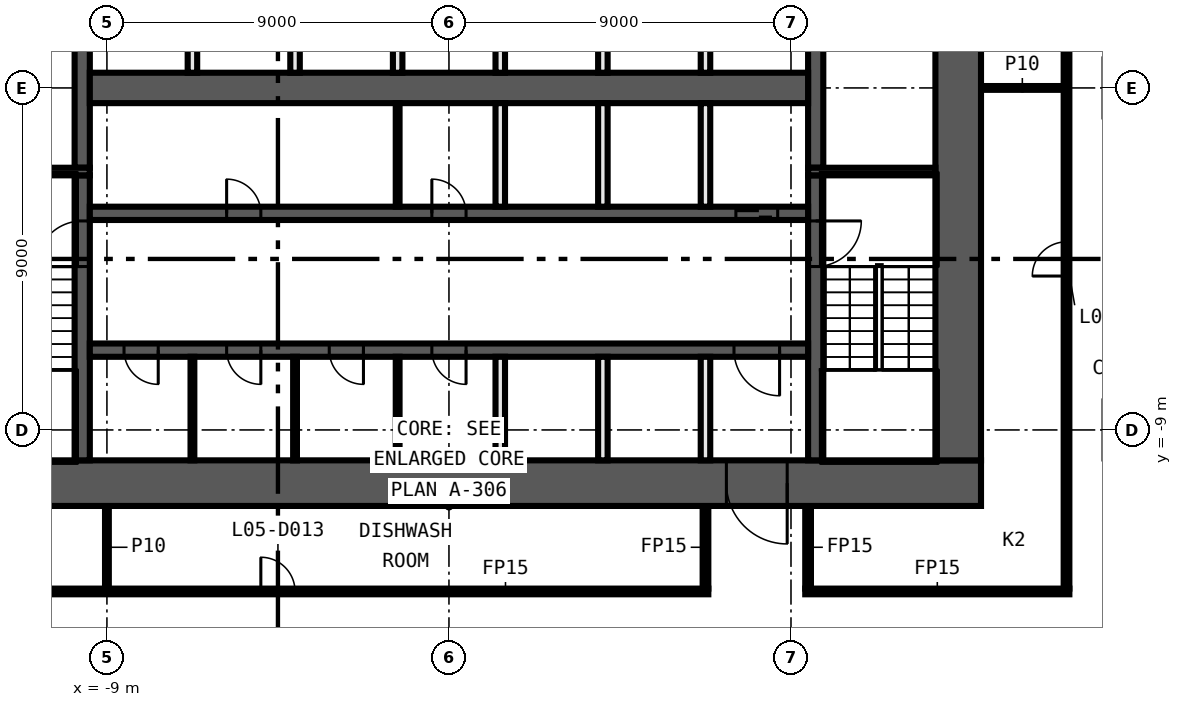
"""IFC4 building model, lengths in metres.
Left out: names, types, materials, properties, quantities, classifications, styles, units other than length and angle.
Written with IfcOpenShell. Run it as: python <this file> out.ifc"""

import sys

from ifc_helpers import new_model, si_unit, direction, frame, frame_2d, origin, place, context, subcontext, project, spatial, rectangle, extrude, element, fill, save


model = new_model("IFC4")
c1 = context("Model", 3, precision=1e-05, world=origin(), true_north=direction((0.0, 1.0)))
c2 = subcontext(c1, "Body", "Model", "MODEL_VIEW")
j1 = project(units=[si_unit("LENGTHUNIT", "METRE"), si_unit("PLANEANGLEUNIT", "RADIAN")], contexts=[c1])
p1 = place(None, origin())
s1 = spatial("IfcSite", under=j1, at=p1, CompositionType="ELEMENT")
p2 = place(p1, origin())
s2 = spatial("IfcBuilding", under=s1, at=p2, CompositionType="ELEMENT")
p3 = place(p2, frame((0.0, 0.0, 38.0)))
s3 = spatial("IfcBuildingStorey", under=s2, at=p3, CompositionType="ELEMENT", Elevation=38.0)
p4 = place(p3, frame((-16.325, -13.25, 0.0), z_axis=(0.0, 0.0, 1.0), x_axis=(1.0, 0.0, 0.0)))
e1 = element("IfcWall", 1, at=p4, inside=s3, PredefinedType="PARTITIONING", context=c2, shape_type="SweptSolid", body=[
    extrude(rectangle(XDim=23.15, YDim=0.15, at=frame_2d((11.575, 0.0))), origin(), (0.0, 0.0, 1.0), 5.6),
])
p5 = place(p4, frame((3.25, 0.0, 0.0)))
e2 = element("IfcOpeningElement", 2, at=p5, cuts=e1, PredefinedType="OPENING", context=c2, shape_type="SweptSolid", body=[
    extrude(rectangle(XDim=0.9, YDim=2.1, at=frame_2d((0.45, 1.05))), frame((0.0, 0.085, 0.0), z_axis=(0.0, -1.0, 0.0), x_axis=(1.0, 0.0, 0.0)), (0.0, 0.0, 1.0), 0.17),
])
p6 = place(p4, frame((11.375, 0.0, 0.0)))
e3 = element("IfcOpeningElement", 3, at=p6, cuts=e1, PredefinedType="OPENING", context=c2, shape_type="SweptSolid", body=[
    extrude(rectangle(XDim=0.9, YDim=2.1, at=frame_2d((0.45, 1.05))), frame((0.0, 0.085, 0.0), z_axis=(0.0, -1.0, 0.0), x_axis=(1.0, 0.0, 0.0)), (0.0, 0.0, 1.0), 0.17),
])
p7 = place(p3, frame((9.375, -13.25, 0.0), z_axis=(0.0, 0.0, 1.0), x_axis=(1.0, 0.0, 0.0)))
e4 = element("IfcWall", 4, at=p7, inside=s3, PredefinedType="PARTITIONING", context=c2, shape_type="SweptSolid", body=[
    extrude(rectangle(XDim=6.95, YDim=0.15, at=frame_2d((3.475, 0.0))), origin(), (0.0, 0.0, 1.0), 5.6),
])
p8 = place(p3, frame((14.0, 0.0, 0.0), z_axis=(0.0, 0.0, 1.0), x_axis=(1.0, 0.0, 0.0)))
e5 = element("IfcWall", 5, at=p8, inside=s3, PredefinedType="PARTITIONING", context=c2, shape_type="SweptSolid", body=[
    extrude(rectangle(XDim=2.175, YDim=0.1, at=frame_2d((1.087, 0.0))), origin(), (0.0, 0.0, 1.0), 5.6),
])
p9 = place(p3, frame((16.25, -13.175, 0.0), z_axis=(0.0, 0.0, 1.0), x_axis=(0.0, 1.0, 0.0)))
e6 = element("IfcWall", 6, at=p9, inside=s3, PredefinedType="PARTITIONING", context=c2, shape_type="SweptSolid", body=[
    extrude(rectangle(XDim=26.35, YDim=0.15, at=frame_2d((13.175, 0.0))), origin(), (0.0, 0.0, 1.0), 5.6),
])
p10 = place(p9, frame((8.225, 0.0, 0.0)))
e7 = element("IfcOpeningElement", 7, at=p10, cuts=e6, PredefinedType="OPENING", context=c2, shape_type="SweptSolid", body=[
    extrude(rectangle(XDim=0.9, YDim=2.1, at=frame_2d((0.45, 1.05))), frame((0.0, 0.085, 0.0), z_axis=(0.0, -1.0, 0.0), x_axis=(1.0, 0.0, 0.0)), (0.0, 0.0, 1.0), 0.17),
])
p11 = place(p9, frame((17.225, 0.0, 0.0)))
e8 = element("IfcOpeningElement", 8, at=p11, cuts=e6, PredefinedType="OPENING", context=c2, shape_type="SweptSolid", body=[
    extrude(rectangle(XDim=0.9, YDim=2.1, at=frame_2d((0.45, 1.05))), frame((0.0, 0.085, 0.0), z_axis=(0.0, -1.0, 0.0), x_axis=(1.0, 0.0, 0.0)), (0.0, 0.0, 1.0), 0.17),
])
for number, where, z_axis, x_axis in (
    (9, (9.45, -13.175, 0.0), (0.0, 0.0, 1.0), (0.0, 1.0, 0.0)),
    (10, (6.75, -13.175, 0.0), (0.0, 0.0, 1.0), (0.0, 1.0, 0.0)),
):
    element("IfcWall", number, at=place(p3, frame(where, z_axis=z_axis, x_axis=x_axis)), inside=s3, PredefinedType="PARTITIONING", context=c2, shape_type="SweptSolid", body=[
        extrude(rectangle(XDim=2.175, YDim=0.15, at=frame_2d((1.087, 0.0))), origin(), (0.0, 0.0, 1.0), 5.6),
    ])
p12 = place(p3, frame((-9.0, -13.175, 0.0), z_axis=(0.0, 0.0, 1.0), x_axis=(0.0, 1.0, 0.0)))
e11 = element("IfcWall", 11, at=p12, inside=s3, PredefinedType="PARTITIONING", context=c2, shape_type="SweptSolid", body=[
    extrude(rectangle(XDim=2.175, YDim=0.1, at=frame_2d((1.087, 0.0))), origin(), (0.0, 0.0, 1.0), 5.6),
])
p13 = place(p3, frame((14.0, -10.4, 0.0), z_axis=(0.0, 0.0, 1.0), x_axis=(-1.0, 0.0, 0.0)))
e12 = element("IfcWall", 12, at=p13, inside=s3, PredefinedType="SHEAR", context=c2, shape_type="SweptSolid", body=[
    extrude(rectangle(XDim=28.0, YDim=1.2, at=frame_2d((14.0, 0.0))), origin(), (0.0, 0.0, 1.0), 5.6),
])
p14 = place(p13, frame((5.1, 0.0, 0.0)))
e13 = element("IfcOpeningElement", 13, at=p14, cuts=e12, PredefinedType="OPENING", context=c2, shape_type="SweptSolid", body=[
    extrude(rectangle(XDim=1.6, YDim=2.1, at=frame_2d((0.8, 1.05))), frame((0.0, 0.61, 0.0), z_axis=(0.0, -1.0, 0.0), x_axis=(1.0, 0.0, 0.0)), (0.0, 0.0, 1.0), 1.22),
])
p15 = place(p3, frame((13.4, 9.8, 0.0), z_axis=(0.0, 0.0, 1.0), x_axis=(0.0, -1.0, 0.0)))
e14 = element("IfcWall", 14, at=p15, inside=s3, PredefinedType="SHEAR", context=c2, shape_type="SweptSolid", body=[
    extrude(rectangle(XDim=19.6, YDim=1.2, at=frame_2d((9.8, 0.0))), origin(), (0.0, 0.0, 1.0), 5.6),
])
p16 = place(p3, frame((9.65, -2.3, 0.0), z_axis=(0.0, 0.0, 1.0), x_axis=(0.0, -1.0, 0.0)))
e15 = element("IfcWall", 15, at=p16, inside=s3, PredefinedType="SHEAR", context=c2, shape_type="SweptSolid", body=[
    extrude(rectangle(XDim=7.5, YDim=0.4, at=frame_2d((3.75, 0.0))), origin(), (0.0, 0.0, 1.0), 5.6),
])
p17 = place(p16, frame((1.2, 0.0, 0.0)))
e16 = element("IfcOpeningElement", 16, at=p17, cuts=e15, PredefinedType="OPENING", context=c2, shape_type="SweptSolid", body=[
    extrude(rectangle(XDim=1.2, YDim=2.1, at=frame_2d((0.6, 1.05))), frame((0.0, 0.21, 0.0), z_axis=(0.0, -1.0, 0.0), x_axis=(1.0, 0.0, 0.0)), (0.0, 0.0, 1.0), 0.42),
])
p18 = place(p3, frame((9.65, 2.1, 0.0), z_axis=(0.0, 0.0, 1.0), x_axis=(0.0, -1.0, 0.0)))
e17 = element("IfcWall", 17, at=p18, inside=s3, PredefinedType="SHEAR", context=c2, shape_type="SweptSolid", body=[
    extrude(rectangle(XDim=4.2, YDim=0.4, at=frame_2d((2.1, 0.0))), origin(), (0.0, 0.0, 1.0), 5.6),
])
p19 = place(p18, frame((0.15, 0.0, 0.0)))
e18 = element("IfcOpeningElement", 18, at=p19, cuts=e17, PredefinedType="OPENING", context=c2, shape_type="SweptSolid", body=[
    extrude(rectangle(XDim=0.9, YDim=2.1, at=frame_2d((0.45, 1.05))), frame((0.0, 0.21, 0.0), z_axis=(0.0, -1.0, 0.0), x_axis=(1.0, 0.0, 0.0)), (0.0, 0.0, 1.0), 0.42),
])
p20 = place(p3, frame((-9.65, -9.8, 0.0), z_axis=(0.0, 0.0, 1.0), x_axis=(0.0, 1.0, 0.0)))
e19 = element("IfcWall", 19, at=p20, inside=s3, PredefinedType="SHEAR", context=c2, shape_type="SweptSolid", body=[
    extrude(rectangle(XDim=7.5, YDim=0.4, at=frame_2d((3.75, 0.0))), origin(), (0.0, 0.0, 1.0), 5.6),
])
p21 = place(p20, frame((5.1, 0.0, 0.0)))
e20 = element("IfcOpeningElement", 20, at=p21, cuts=e19, PredefinedType="OPENING", context=c2, shape_type="SweptSolid", body=[
    extrude(rectangle(XDim=1.2, YDim=2.1, at=frame_2d((0.6, 1.05))), frame((0.0, 0.21, 0.0), z_axis=(0.0, -1.0, 0.0), x_axis=(1.0, 0.0, 0.0)), (0.0, 0.0, 1.0), 0.42),
])
p22 = place(p3, frame((-9.65, -2.1, 0.0), z_axis=(0.0, 0.0, 1.0), x_axis=(0.0, 1.0, 0.0)))
e21 = element("IfcWall", 21, at=p22, inside=s3, PredefinedType="SHEAR", context=c2, shape_type="SweptSolid", body=[
    extrude(rectangle(XDim=4.2, YDim=0.4, at=frame_2d((2.1, 0.0))), origin(), (0.0, 0.0, 1.0), 5.6),
])
for number, where, z_axis, x_axis in (
    (22, (9.45, -2.2, 0.0), (0.0, 0.0, 1.0), (1.0, 0.0, 0.0)),
    (23, (-9.45, -2.2, 0.0), (0.0, 0.0, 1.0), (-1.0, 0.0, 0.0)),
):
    element("IfcWall", number, at=place(p3, frame(where, z_axis=z_axis, x_axis=x_axis)), inside=s3, PredefinedType="SHEAR", context=c2, shape_type="SweptSolid", body=[
        extrude(rectangle(XDim=3.35, YDim=0.2, at=frame_2d((1.675, 0.0))), origin(), (0.0, 0.0, 1.0), 5.6),
    ])
p23 = place(p3, frame((-9.45, -3.3, 0.0), z_axis=(0.0, 0.0, 1.0), x_axis=(1.0, 0.0, 0.0)))
e24 = element("IfcWall", 24, at=p23, inside=s3, PredefinedType="SHEAR", context=c2, shape_type="SweptSolid", body=[
    extrude(rectangle(XDim=18.9, YDim=0.35, at=frame_2d((9.45, 0.0))), origin(), (0.0, 0.0, 1.0), 5.6),
])
p24 = place(p23, frame((17.0, 0.0, 0.0)))
e25 = element("IfcOpeningElement", 25, at=p24, cuts=e24, PredefinedType="OPENING", context=c2, shape_type="SweptSolid", body=[
    extrude(rectangle(XDim=1.1, YDim=2.1, at=frame_2d((0.55, 1.05))), frame((0.0, 0.185, 0.0), z_axis=(0.0, -1.0, 0.0), x_axis=(1.0, 0.0, 0.0)), (0.0, 0.0, 1.0), 0.37),
])
p25 = place(p23, frame((3.6, 0.0, 0.0)))
e26 = element("IfcOpeningElement", 26, at=p25, cuts=e24, PredefinedType="OPENING", context=c2, shape_type="SweptSolid", body=[
    extrude(rectangle(XDim=0.9, YDim=2.1, at=frame_2d((0.45, 1.05))), frame((0.0, 0.185, 0.0), z_axis=(0.0, -1.0, 0.0), x_axis=(1.0, 0.0, 0.0)), (0.0, 0.0, 1.0), 0.37),
])
p26 = place(p23, frame((9.0, 0.0, 0.0)))
e27 = element("IfcOpeningElement", 27, at=p26, cuts=e24, PredefinedType="OPENING", context=c2, shape_type="SweptSolid", body=[
    extrude(rectangle(XDim=0.9, YDim=2.1, at=frame_2d((0.45, 1.05))), frame((0.0, 0.185, 0.0), z_axis=(0.0, -1.0, 0.0), x_axis=(1.0, 0.0, 0.0)), (0.0, 0.0, 1.0), 0.37),
])
p27 = place(p3, frame((9.45, -6.9, 0.0), z_axis=(0.0, 0.0, 1.0), x_axis=(-1.0, 0.0, 0.0)))
e28 = element("IfcWall", 28, at=p27, inside=s3, PredefinedType="SHEAR", context=c2, shape_type="SweptSolid", body=[
    extrude(rectangle(XDim=18.9, YDim=0.35, at=frame_2d((9.45, 0.0))), origin(), (0.0, 0.0, 1.0), 5.6),
])
p28 = place(p27, frame((0.75, 0.0, 0.0)))
e29 = element("IfcOpeningElement", 29, at=p28, cuts=e28, PredefinedType="OPENING", context=c2, shape_type="SweptSolid", body=[
    extrude(rectangle(XDim=1.2, YDim=2.1, at=frame_2d((0.6, 1.05))), frame((0.0, 0.185, 0.0), z_axis=(0.0, -1.0, 0.0), x_axis=(1.0, 0.0, 0.0)), (0.0, 0.0, 1.0), 0.37),
])
p29 = place(p27, frame((17.1, 0.0, 0.0)))
e30 = element("IfcOpeningElement", 30, at=p29, cuts=e28, PredefinedType="OPENING", context=c2, shape_type="SweptSolid", body=[
    extrude(rectangle(XDim=0.9, YDim=2.1, at=frame_2d((0.45, 1.05))), frame((0.0, 0.185, 0.0), z_axis=(0.0, -1.0, 0.0), x_axis=(1.0, 0.0, 0.0)), (0.0, 0.0, 1.0), 0.37),
])
p30 = place(p27, frame((14.4, 0.0, 0.0)))
e31 = element("IfcOpeningElement", 31, at=p30, cuts=e28, PredefinedType="OPENING", context=c2, shape_type="SweptSolid", body=[
    extrude(rectangle(XDim=0.9, YDim=2.1, at=frame_2d((0.45, 1.05))), frame((0.0, 0.185, 0.0), z_axis=(0.0, -1.0, 0.0), x_axis=(1.0, 0.0, 0.0)), (0.0, 0.0, 1.0), 0.37),
])
p31 = place(p27, frame((11.7, 0.0, 0.0)))
e32 = element("IfcOpeningElement", 32, at=p31, cuts=e28, PredefinedType="OPENING", context=c2, shape_type="SweptSolid", body=[
    extrude(rectangle(XDim=0.9, YDim=2.1, at=frame_2d((0.45, 1.05))), frame((0.0, 0.185, 0.0), z_axis=(0.0, -1.0, 0.0), x_axis=(1.0, 0.0, 0.0)), (0.0, 0.0, 1.0), 0.37),
])
p32 = place(p27, frame((9.0, 0.0, 0.0)))
e33 = element("IfcOpeningElement", 33, at=p32, cuts=e28, PredefinedType="OPENING", context=c2, shape_type="SweptSolid", body=[
    extrude(rectangle(XDim=0.9, YDim=2.1, at=frame_2d((0.45, 1.05))), frame((0.0, 0.185, 0.0), z_axis=(0.0, -1.0, 0.0), x_axis=(1.0, 0.0, 0.0)), (0.0, 0.0, 1.0), 0.37),
])
p33 = place(p3, frame((-9.45, 0.0, 0.0), z_axis=(0.0, 0.0, 1.0), x_axis=(1.0, 0.0, 0.0)))
e34 = element("IfcWall", 34, at=p33, inside=s3, PredefinedType="SHEAR", context=c2, shape_type="SweptSolid", body=[
    extrude(rectangle(XDim=18.9, YDim=0.8, at=frame_2d((9.45, 0.0))), origin(), (0.0, 0.0, 1.0), 5.6),
])
for number, where, z_axis, x_axis in (
    (35, (6.75, -9.8, 0.0), (0.0, 0.0, 1.0), (0.0, 1.0, 0.0)),
    (36, (6.75, -3.125, 0.0), (0.0, 0.0, 1.0), (0.0, 1.0, 0.0)),
    (37, (6.75, 0.4, 0.0), (0.0, 0.0, 1.0), (0.0, 1.0, 0.0)),
    (38, (4.05, -9.8, 0.0), (0.0, 0.0, 1.0), (0.0, 1.0, 0.0)),
    (39, (4.05, -3.125, 0.0), (0.0, 0.0, 1.0), (0.0, 1.0, 0.0)),
    (40, (4.05, 0.4, 0.0), (0.0, 0.0, 1.0), (0.0, 1.0, 0.0)),
    (41, (1.35, -9.8, 0.0), (0.0, 0.0, 1.0), (0.0, 1.0, 0.0)),
    (42, (1.35, -3.125, 0.0), (0.0, 0.0, 1.0), (0.0, 1.0, 0.0)),
    (43, (1.35, 0.4, 0.0), (0.0, 0.0, 1.0), (0.0, 1.0, 0.0)),
):
    element("IfcWall", number, at=place(p3, frame(where, z_axis=z_axis, x_axis=x_axis)), inside=s3, PredefinedType="SOLIDWALL", context=c2, shape_type="SweptSolid", body=[
        extrude(rectangle(XDim=2.725, YDim=0.25, at=frame_2d((1.363, 0.0))), origin(), (0.0, 0.0, 1.0), 5.6),
    ])
for number, where, z_axis, x_axis in (
    (44, (-1.35, -9.8, 0.0), (0.0, 0.0, 1.0), (0.0, 1.0, 0.0)),
    (45, (-1.35, -3.125, 0.0), (0.0, 0.0, 1.0), (0.0, 1.0, 0.0)),
):
    element("IfcWall", number, at=place(p3, frame(where, z_axis=z_axis, x_axis=x_axis)), inside=s3, PredefinedType="PARTITIONING", context=c2, shape_type="SweptSolid", body=[
        extrude(rectangle(XDim=2.725, YDim=0.1, at=frame_2d((1.363, 0.0))), origin(), (0.0, 0.0, 1.0), 5.6),
    ])
p34 = place(p3, frame((-1.35, 0.4, 0.0), z_axis=(0.0, 0.0, 1.0), x_axis=(0.0, 1.0, 0.0)))
e46 = element("IfcWall", 46, at=p34, inside=s3, PredefinedType="SOLIDWALL", context=c2, shape_type="SweptSolid", body=[
    extrude(rectangle(XDim=2.725, YDim=0.25, at=frame_2d((1.363, 0.0))), origin(), (0.0, 0.0, 1.0), 5.6),
])
p35 = place(p3, frame((-4.05, -9.8, 0.0), z_axis=(0.0, 0.0, 1.0), x_axis=(0.0, 1.0, 0.0)))
e47 = element("IfcWall", 47, at=p35, inside=s3, PredefinedType="PARTITIONING", context=c2, shape_type="SweptSolid", body=[
    extrude(rectangle(XDim=2.725, YDim=0.1, at=frame_2d((1.363, 0.0))), origin(), (0.0, 0.0, 1.0), 5.6),
])
p36 = place(p3, frame((-4.05, 0.4, 0.0), z_axis=(0.0, 0.0, 1.0), x_axis=(0.0, 1.0, 0.0)))
e48 = element("IfcWall", 48, at=p36, inside=s3, PredefinedType="SOLIDWALL", context=c2, shape_type="SweptSolid", body=[
    extrude(rectangle(XDim=2.725, YDim=0.25, at=frame_2d((1.363, 0.0))), origin(), (0.0, 0.0, 1.0), 5.6),
])
p37 = place(p3, frame((-6.75, -9.8, 0.0), z_axis=(0.0, 0.0, 1.0), x_axis=(0.0, 1.0, 0.0)))
e49 = element("IfcWall", 49, at=p37, inside=s3, PredefinedType="PARTITIONING", context=c2, shape_type="SweptSolid", body=[
    extrude(rectangle(XDim=2.725, YDim=0.1, at=frame_2d((1.363, 0.0))), origin(), (0.0, 0.0, 1.0), 5.6),
])
p38 = place(p3, frame((-6.75, 0.4, 0.0), z_axis=(0.0, 0.0, 1.0), x_axis=(0.0, 1.0, 0.0)))
e50 = element("IfcWall", 50, at=p38, inside=s3, PredefinedType="SOLIDWALL", context=c2, shape_type="SweptSolid", body=[
    extrude(rectangle(XDim=2.725, YDim=0.25, at=frame_2d((1.363, 0.0))), origin(), (0.0, 0.0, 1.0), 5.6),
])
p39 = place(p6, origin())
e51 = element("IfcDoor", 51, at=p39, inside=s3, OperationType="SINGLE_SWING_RIGHT", PredefinedType="DOOR", context=c2, shape_type="SweptSolid", body=[
    extrude(rectangle(XDim=0.9, YDim=2.1, at=frame_2d((0.45, 1.05))), frame((0.0, 0.025, 0.0), z_axis=(0.0, -1.0, 0.0), x_axis=(1.0, 0.0, 0.0)), (0.0, 0.0, 1.0), 0.05),
])
fill(e3, e51)
p40 = place(p10, origin())
e52 = element("IfcDoor", 52, at=p40, inside=s3, OperationType="SINGLE_SWING_LEFT", PredefinedType="DOOR", context=c2, shape_type="SweptSolid", body=[
    extrude(rectangle(XDim=0.9, YDim=2.1, at=frame_2d((0.45, 1.05))), frame((0.0, 0.025, 0.0), z_axis=(0.0, -1.0, 0.0), x_axis=(1.0, 0.0, 0.0)), (0.0, 0.0, 1.0), 0.05),
])
fill(e7, e52)
p41 = place(p24, origin())
e53 = element("IfcDoor", 53, at=p41, inside=s3, OperationType="DOUBLE_DOOR_SLIDING", PredefinedType="DOOR", context=c2, shape_type="SweptSolid", body=[
    extrude(rectangle(XDim=1.1, YDim=2.1, at=frame_2d((0.55, 1.05))), frame((0.0, 0.025, 0.0), z_axis=(0.0, -1.0, 0.0), x_axis=(1.0, 0.0, 0.0)), (0.0, 0.0, 1.0), 0.05),
])
fill(e25, e53)
p42 = place(p14, origin())
e54 = element("IfcDoor", 54, at=p42, inside=s3, OperationType="DOUBLE_DOOR_SINGLE_SWING", PredefinedType="DOOR", context=c2, shape_type="SweptSolid", body=[
    extrude(rectangle(XDim=1.6, YDim=2.1, at=frame_2d((0.8, 1.05))), frame((0.0, 0.025, 0.0), z_axis=(0.0, -1.0, 0.0), x_axis=(1.0, 0.0, 0.0)), (0.0, 0.0, 1.0), 0.05),
])
fill(e13, e54)
p43 = place(p28, origin())
e55 = element("IfcDoor", 55, at=p43, inside=s3, OperationType="SINGLE_SWING_LEFT", PredefinedType="DOOR", context=c2, shape_type="SweptSolid", body=[
    extrude(rectangle(XDim=1.2, YDim=2.1, at=frame_2d((0.6, 1.05))), frame((0.0, 0.025, 0.0), z_axis=(0.0, -1.0, 0.0), x_axis=(1.0, 0.0, 0.0)), (0.0, 0.0, 1.0), 0.05),
])
fill(e29, e55)
p44 = place(p25, origin())
e56 = element("IfcDoor", 56, at=p44, inside=s3, OperationType="SINGLE_SWING_RIGHT", PredefinedType="DOOR", context=c2, shape_type="SweptSolid", body=[
    extrude(rectangle(XDim=0.9, YDim=2.1, at=frame_2d((0.45, 1.05))), frame((0.0, 0.025, 0.0), z_axis=(0.0, -1.0, 0.0), x_axis=(1.0, 0.0, 0.0)), (0.0, 0.0, 1.0), 0.05),
])
fill(e26, e56)
p45 = place(p26, origin())
e57 = element("IfcDoor", 57, at=p45, inside=s3, OperationType="SINGLE_SWING_LEFT", PredefinedType="DOOR", context=c2, shape_type="SweptSolid", body=[
    extrude(rectangle(XDim=0.9, YDim=2.1, at=frame_2d((0.45, 1.05))), frame((0.0, 0.025, 0.0), z_axis=(0.0, -1.0, 0.0), x_axis=(1.0, 0.0, 0.0)), (0.0, 0.0, 1.0), 0.05),
])
fill(e27, e57)
p46 = place(p29, origin())
e58 = element("IfcDoor", 58, at=p46, inside=s3, OperationType="SINGLE_SWING_RIGHT", PredefinedType="DOOR", context=c2, shape_type="SweptSolid", body=[
    extrude(rectangle(XDim=0.9, YDim=2.1, at=frame_2d((0.45, 1.05))), frame((0.0, 0.025, 0.0), z_axis=(0.0, -1.0, 0.0), x_axis=(1.0, 0.0, 0.0)), (0.0, 0.0, 1.0), 0.05),
])
fill(e30, e58)
p47 = place(p30, origin())
e59 = element("IfcDoor", 59, at=p47, inside=s3, OperationType="SINGLE_SWING_LEFT", PredefinedType="DOOR", context=c2, shape_type="SweptSolid", body=[
    extrude(rectangle(XDim=0.9, YDim=2.1, at=frame_2d((0.45, 1.05))), frame((0.0, 0.025, 0.0), z_axis=(0.0, -1.0, 0.0), x_axis=(1.0, 0.0, 0.0)), (0.0, 0.0, 1.0), 0.05),
])
fill(e31, e59)
p48 = place(p31, origin())
e60 = element("IfcDoor", 60, at=p48, inside=s3, OperationType="SINGLE_SWING_RIGHT", PredefinedType="DOOR", context=c2, shape_type="SweptSolid", body=[
    extrude(rectangle(XDim=0.9, YDim=2.1, at=frame_2d((0.45, 1.05))), frame((0.0, 0.025, 0.0), z_axis=(0.0, -1.0, 0.0), x_axis=(1.0, 0.0, 0.0)), (0.0, 0.0, 1.0), 0.05),
])
fill(e32, e60)
p49 = place(p32, origin())
e61 = element("IfcDoor", 61, at=p49, inside=s3, OperationType="SINGLE_SWING_LEFT", PredefinedType="DOOR", context=c2, shape_type="SweptSolid", body=[
    extrude(rectangle(XDim=0.9, YDim=2.1, at=frame_2d((0.45, 1.05))), frame((0.0, 0.025, 0.0), z_axis=(0.0, -1.0, 0.0), x_axis=(1.0, 0.0, 0.0)), (0.0, 0.0, 1.0), 0.05),
])
fill(e33, e61)
p50 = place(p17, origin())
e62 = element("IfcDoor", 62, at=p50, inside=s3, OperationType="SINGLE_SWING_RIGHT", PredefinedType="DOOR", context=c2, shape_type="SweptSolid", body=[
    extrude(rectangle(XDim=1.2, YDim=2.1, at=frame_2d((0.6, 1.05))), frame((0.0, 0.025, 0.0), z_axis=(0.0, -1.0, 0.0), x_axis=(1.0, 0.0, 0.0)), (0.0, 0.0, 1.0), 0.05),
])
fill(e16, e62)
p51 = place(p21, origin())
e63 = element("IfcDoor", 63, at=p51, inside=s3, OperationType="SINGLE_SWING_LEFT", PredefinedType="DOOR", context=c2, shape_type="SweptSolid", body=[
    extrude(rectangle(XDim=1.2, YDim=2.1, at=frame_2d((0.6, 1.05))), frame((0.0, 0.025, 0.0), z_axis=(0.0, -1.0, 0.0), x_axis=(1.0, 0.0, 0.0)), (0.0, 0.0, 1.0), 0.05),
])
fill(e20, e63)
save(model, sys.argv[1])
